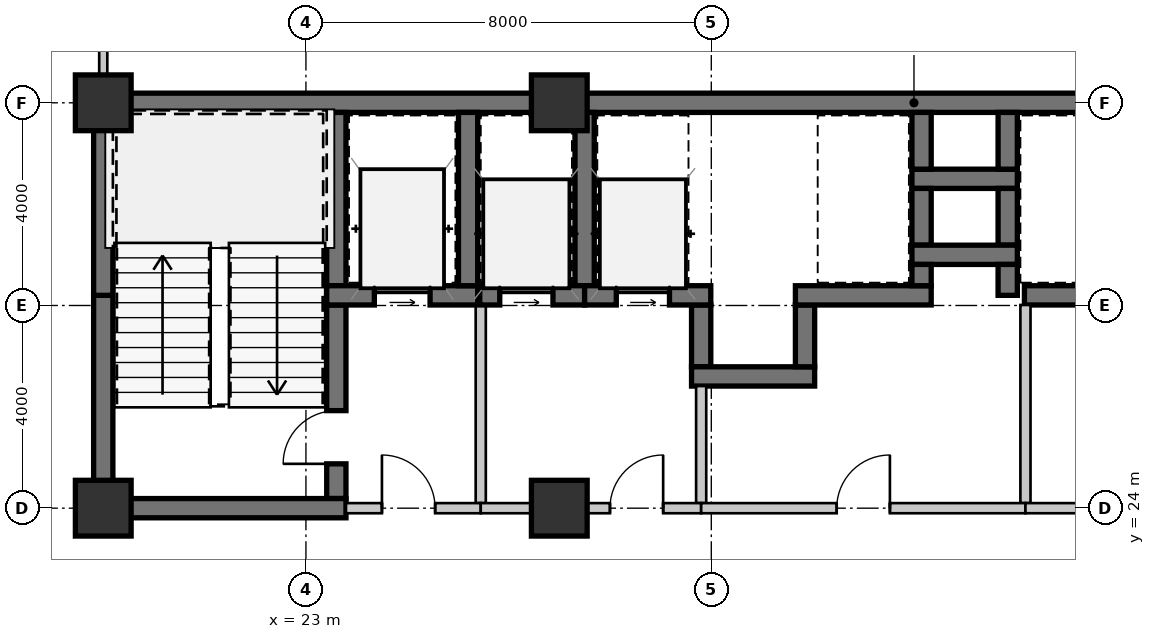
"""IFC4 building model, lengths in metres.
Left out: names, types, materials, properties, quantities, classifications, styles, units other than length and angle.
Written with IfcOpenShell. Run it as: python <this file> out.ifc"""

import sys

from ifc_helpers import new_model, si_unit, direction, frame, frame_2d, origin, origin_2d, place, context, subcontext, project, spatial, rectangle, extrude, source, transform, mapped, element, fill, save


model = new_model("IFC4")
c1 = context("Model", 3, precision=1e-05, world=origin(), true_north=direction((0.0, 1.0)))
c2 = subcontext(c1, "Body", "Model", "MODEL_VIEW")
j1 = project(units=[si_unit("LENGTHUNIT", "METRE"), si_unit("PLANEANGLEUNIT", "RADIAN")], contexts=[c1])
p1 = place(None, origin())
s1 = spatial("IfcSite", under=j1, at=p1, CompositionType="ELEMENT")
p2 = place(p1, origin())
s2 = spatial("IfcBuilding", under=s1, at=p2, CompositionType="ELEMENT")
p3 = place(p2, frame((0.0, 0.0, 4.55)))
s3 = spatial("IfcBuildingStorey", under=s2, at=p3, CompositionType="ELEMENT", Elevation=4.55)
m1 = source(origin(), c2, "Body", "SweptSolid", [
    extrude(rectangle(XDim=1.1, YDim=1.1, at=origin_2d()), origin(), (0.0, 0.0, 1.0), 3.85),
])
for number, where, z_axis, x_axis in (
    (1, (19.0, 24.0, 0.0), (0.0, 0.0, 1.0), (1.0, 0.0, 0.0)),
    (2, (28.0, 24.0, 0.0), (0.0, 0.0, 1.0), (1.0, 0.0, 0.0)),
    (3, (19.0, 32.0, 0.0), (0.0, 0.0, 1.0), (1.0, 0.0, 0.0)),
    (4, (28.0, 32.0, 0.0), (0.0, 0.0, 1.0), (1.0, 0.0, 0.0)),
):
    element("IfcColumn", number, at=place(p3, frame(where, z_axis=z_axis, x_axis=x_axis)), inside=s3, PredefinedType="COLUMN", context=c2, shape_type="MappedRepresentation", body=[
        mapped(m1, transform((0.0, 0.0, 0.0), scale=1.0)),
    ])
m2 = source(origin(), c2, "Body", "SweptSolid", [
    extrude(rectangle(XDim=9.19, YDim=0.38, at=frame_2d((4.595, 0.0))), origin(), (0.0, 0.0, 1.0), 3.59),
])
p4 = place(p3, frame((18.81, 32.0, 0.0), z_axis=(0.0, 0.0, 1.0), x_axis=(1.0, 0.0, 0.0)))
e5 = element("IfcWall", 5, at=p4, inside=s3, PredefinedType="SHEAR", context=c2, shape_type="MappedRepresentation", body=[
    mapped(m2, transform((0.0, 0.0, 0.0), scale=1.0)),
])
m3 = source(origin(), c2, "Body", "SweptSolid", [
    extrude(rectangle(XDim=11.2, YDim=0.38, at=frame_2d((5.6, 0.0))), origin(), (0.0, 0.0, 1.0), 3.59),
])
p5 = place(p3, frame((28.0, 32.0, 0.0), z_axis=(0.0, 0.0, 1.0), x_axis=(1.0, 0.0, 0.0)))
e6 = element("IfcWall", 6, at=p5, inside=s3, PredefinedType="SHEAR", context=c2, shape_type="MappedRepresentation", body=[
    mapped(m3, transform((0.0, 0.0, 0.0), scale=1.0)),
])
m4 = source(origin(), c2, "Body", "SweptSolid", [
    extrude(rectangle(XDim=4.01, YDim=0.38, at=frame_2d((2.005, 0.0))), origin(), (0.0, 0.0, 1.0), 3.59),
])
p6 = place(p3, frame((19.0, 24.19, 0.0), z_axis=(0.0, 0.0, 1.0), x_axis=(0.0, 1.0, 0.0)))
e7 = element("IfcWall", 7, at=p6, inside=s3, PredefinedType="SHEAR", context=c2, shape_type="MappedRepresentation", body=[
    mapped(m4, transform((0.0, 0.0, 0.0), scale=1.0)),
])
m5 = source(origin(), c2, "Body", "SweptSolid", [
    extrude(rectangle(XDim=3.61, YDim=0.38, at=frame_2d((1.805, 0.0))), origin(), (0.0, 0.0, 1.0), 3.59),
])
p7 = place(p3, frame((19.0, 28.2, 0.0), z_axis=(0.0, 0.0, 1.0), x_axis=(0.0, 1.0, 0.0)))
e8 = element("IfcWall", 8, at=p7, inside=s3, PredefinedType="SHEAR", context=c2, shape_type="MappedRepresentation", body=[
    mapped(m5, transform((0.0, 0.0, 0.0), scale=1.0)),
])
m6 = source(origin(), c2, "Body", "SweptSolid", [
    extrude(rectangle(XDim=3.42, YDim=0.38, at=frame_2d((1.71, 0.0))), origin(), (0.0, 0.0, 1.0), 3.59),
])
p8 = place(p3, frame((23.6, 28.39, 0.0), z_axis=(0.0, 0.0, 1.0), x_axis=(0.0, 1.0, 0.0)))
e9 = element("IfcWall", 9, at=p8, inside=s3, PredefinedType="SHEAR", context=c2, shape_type="MappedRepresentation", body=[
    mapped(m6, transform((0.0, 0.0, 0.0), scale=1.0)),
])
m7 = source(origin(), c2, "Body", "SweptSolid", [
    extrude(rectangle(XDim=3.82, YDim=0.38, at=frame_2d((1.91, 0.0))), origin(), (0.0, 0.0, 1.0), 3.59),
])
p9 = place(p3, frame((23.6, 24.19, 0.0), z_axis=(0.0, 0.0, 1.0), x_axis=(0.0, 1.0, 0.0)))
e10 = element("IfcWall", 10, at=p9, inside=s3, PredefinedType="SHEAR", context=c2, shape_type="MappedRepresentation", body=[
    mapped(m7, transform((0.0, 0.0, 0.0), scale=1.0)),
])
m8 = source(origin(), c2, "Body", "SweptSolid", [
    extrude(rectangle(XDim=1.05, YDim=2.1, at=frame_2d((0.525, 1.05))), frame((0.0, 0.2, 0.0), z_axis=(0.0, -1.0, 0.0), x_axis=(1.0, 0.0, 0.0)), (0.0, 0.0, 1.0), 0.4),
])
p10 = place(p9, frame((0.685, 0.0, 0.0)))
e11 = element("IfcOpeningElement", 11, at=p10, cuts=e10, PredefinedType="OPENING", context=c2, shape_type="MappedRepresentation", body=[
    mapped(m8, transform((0.0, 0.0, 0.0), scale=1.0)),
])
m9 = source(origin(), c2, "Body", "SweptSolid", [
    extrude(rectangle(XDim=4.98, YDim=0.38, at=frame_2d((2.49, 0.0))), origin(), (0.0, 0.0, 1.0), 3.59),
])
p11 = place(p3, frame((18.81, 24.0, 0.0), z_axis=(0.0, 0.0, 1.0), x_axis=(1.0, 0.0, 0.0)))
e12 = element("IfcWall", 12, at=p11, inside=s3, PredefinedType="SHEAR", context=c2, shape_type="MappedRepresentation", body=[
    mapped(m9, transform((0.0, 0.0, 0.0), scale=1.0)),
])
m10 = source(origin(), c2, "Body", "SweptSolid", [
    extrude(rectangle(XDim=2.98, YDim=0.38, at=frame_2d((1.49, 0.0))), origin(), (0.0, 0.0, 1.0), 3.59),
])
p12 = place(p3, frame((23.41, 28.2, 0.0), z_axis=(0.0, 0.0, 1.0), x_axis=(1.0, 0.0, 0.0)))
e13 = element("IfcWall", 13, at=p12, inside=s3, PredefinedType="SHEAR", context=c2, shape_type="MappedRepresentation", body=[
    mapped(m10, transform((0.0, 0.0, 0.0), scale=1.0)),
])
m11 = source(origin(), c2, "Body", "SweptSolid", [
    extrude(rectangle(XDim=1.1, YDim=2.15, at=frame_2d((0.55, 1.075))), frame((0.0, 0.2, 0.0), z_axis=(0.0, -1.0, 0.0), x_axis=(1.0, 0.0, 0.0)), (0.0, 0.0, 1.0), 0.4),
])
p13 = place(p12, frame((0.94, 0.0, 0.0)))
e14 = element("IfcOpeningElement", 14, at=p13, cuts=e13, PredefinedType="OPENING", context=c2, shape_type="MappedRepresentation", body=[
    mapped(m11, transform((0.0, 0.0, 0.0), scale=1.0)),
])
p14 = place(p3, frame((26.2, 28.39, 0.0), z_axis=(0.0, 0.0, 1.0), x_axis=(0.0, 1.0, 0.0)))
e15 = element("IfcWall", 15, at=p14, inside=s3, PredefinedType="SHEAR", context=c2, shape_type="MappedRepresentation", body=[
    mapped(m6, transform((0.0, 0.0, 0.0), scale=1.0)),
])
m12 = source(origin(), c2, "Body", "SweptSolid", [
    extrude(rectangle(XDim=3.91, YDim=0.2, at=frame_2d((1.955, 0.0))), origin(), (0.0, 0.0, 1.0), 3.59),
])
p15 = place(p3, frame((26.45, 24.1, 0.0), z_axis=(0.0, 0.0, 1.0), x_axis=(0.0, 1.0, 0.0)))
e16 = element("IfcWall", 16, at=p15, inside=s3, PredefinedType="SOLIDWALL", context=c2, shape_type="MappedRepresentation", body=[
    mapped(m12, transform((0.0, 0.0, 0.0), scale=1.0)),
])
m13 = source(origin(), c2, "Body", "SweptSolid", [
    extrude(rectangle(XDim=2.66, YDim=0.2, at=frame_2d((1.33, 0.0))), origin(), (0.0, 0.0, 1.0), 3.13),
])
p16 = place(p3, frame((23.79, 24.0, 0.0), z_axis=(0.0, 0.0, 1.0), x_axis=(1.0, 0.0, 0.0)))
e17 = element("IfcWall", 17, at=p16, inside=s3, PredefinedType="SOLIDWALL", context=c2, shape_type="MappedRepresentation", body=[
    mapped(m13, transform((0.0, 0.0, 0.0), scale=1.0)),
])
m14 = source(origin(), c2, "Body", "SweptSolid", [
    extrude(rectangle(XDim=1.05, YDim=2.1, at=frame_2d((0.525, 1.05))), frame((0.0, 0.11, 0.0), z_axis=(0.0, -1.0, 0.0), x_axis=(1.0, 0.0, 0.0)), (0.0, 0.0, 1.0), 0.22),
])
p17 = place(p16, frame((0.71, 0.0, 0.0)))
e18 = element("IfcOpeningElement", 18, at=p17, cuts=e17, PredefinedType="OPENING", context=c2, shape_type="MappedRepresentation", body=[
    mapped(m14, transform((0.0, 0.0, 0.0), scale=1.0)),
])
m15 = source(origin(), c2, "Body", "SweptSolid", [
    extrude(rectangle(XDim=2.08, YDim=0.38, at=frame_2d((1.04, 0.0))), origin(), (0.0, 0.0, 1.0), 3.59),
])
p18 = place(p3, frame((34.96, 30.5, 0.0), z_axis=(0.0, 0.0, 1.0), x_axis=(1.0, 0.0, 0.0)))
e19 = element("IfcWall", 19, at=p18, inside=s3, PredefinedType="SHEAR", context=c2, shape_type="MappedRepresentation", body=[
    mapped(m15, transform((0.0, 0.0, 0.0), scale=1.0)),
])
m16 = source(origin(), c2, "Body", "SweptSolid", [
    extrude(rectangle(XDim=1.12, YDim=0.38, at=frame_2d((0.56, 0.0))), origin(), (0.0, 0.0, 1.0), 3.59),
])
for number, where, z_axis, x_axis in (
    (20, (35.15, 31.81, 0.0), (0.0, 0.0, 1.0), (0.0, -1.0, 0.0)),
    (21, (36.85, 30.69, 0.0), (0.0, 0.0, 1.0), (0.0, 1.0, 0.0)),
    (22, (35.15, 30.31, 0.0), (0.0, 0.0, 1.0), (0.0, -1.0, 0.0)),
    (23, (36.85, 29.19, 0.0), (0.0, 0.0, 1.0), (0.0, 1.0, 0.0)),
):
    element("IfcWall", number, at=place(p3, frame(where, z_axis=z_axis, x_axis=x_axis)), inside=s3, PredefinedType="SHEAR", context=c2, shape_type="MappedRepresentation", body=[
        mapped(m16, transform((0.0, 0.0, 0.0), scale=1.0)),
    ])
p19 = place(p3, frame((34.96, 29.0, 0.0), z_axis=(0.0, 0.0, 1.0), x_axis=(1.0, 0.0, 0.0)))
e24 = element("IfcWall", 24, at=p19, inside=s3, PredefinedType="SHEAR", context=c2, shape_type="MappedRepresentation", body=[
    mapped(m15, transform((0.0, 0.0, 0.0), scale=1.0)),
])
m17 = source(origin(), c2, "Body", "SweptSolid", [
    extrude(rectangle(XDim=1.22, YDim=0.38, at=frame_2d((0.61, 0.0))), origin(), (0.0, 0.0, 1.0), 3.59),
])
p20 = place(p3, frame((30.8, 28.01, 0.0), z_axis=(0.0, 0.0, 1.0), x_axis=(0.0, -1.0, 0.0)))
e25 = element("IfcWall", 25, at=p20, inside=s3, PredefinedType="SHEAR", context=c2, shape_type="MappedRepresentation", body=[
    mapped(m17, transform((0.0, 0.0, 0.0), scale=1.0)),
])
m18 = source(origin(), c2, "Body", "SweptSolid", [
    extrude(rectangle(XDim=2.43, YDim=0.38, at=frame_2d((1.215, 0.0))), origin(), (0.0, 0.0, 1.0), 3.59),
])
p21 = place(p3, frame((30.61, 26.6, 0.0), z_axis=(0.0, 0.0, 1.0), x_axis=(1.0, 0.0, 0.0)))
e26 = element("IfcWall", 26, at=p21, inside=s3, PredefinedType="SHEAR", context=c2, shape_type="MappedRepresentation", body=[
    mapped(m18, transform((0.0, 0.0, 0.0), scale=1.0)),
])
p22 = place(p3, frame((32.85, 26.79, 0.0), z_axis=(0.0, 0.0, 1.0), x_axis=(0.0, 1.0, 0.0)))
e27 = element("IfcWall", 27, at=p22, inside=s3, PredefinedType="SHEAR", context=c2, shape_type="MappedRepresentation", body=[
    mapped(m17, transform((0.0, 0.0, 0.0), scale=1.0)),
])
p23 = place(p3, frame((28.5, 28.39, 0.0), z_axis=(0.0, 0.0, 1.0), x_axis=(0.0, 1.0, 0.0)))
e28 = element("IfcWall", 28, at=p23, inside=s3, PredefinedType="SHEAR", context=c2, shape_type="MappedRepresentation", body=[
    mapped(m6, transform((0.0, 0.0, 0.0), scale=1.0)),
])
m19 = source(origin(), c2, "Body", "SweptSolid", [
    extrude(rectangle(XDim=2.07, YDim=0.38, at=frame_2d((1.035, 0.0))), origin(), (0.0, 0.0, 1.0), 3.59),
])
p24 = place(p3, frame((26.43, 28.2, 0.0), z_axis=(0.0, 0.0, 1.0), x_axis=(1.0, 0.0, 0.0)))
e29 = element("IfcWall", 29, at=p24, inside=s3, PredefinedType="SHEAR", context=c2, shape_type="MappedRepresentation", body=[
    mapped(m19, transform((0.0, 0.0, 0.0), scale=1.0)),
])
m20 = source(origin(), c2, "Body", "SweptSolid", [
    extrude(rectangle(XDim=1.05, YDim=2.15, at=frame_2d((0.525, 1.075))), frame((0.0, 0.2, 0.0), z_axis=(0.0, -1.0, 0.0), x_axis=(1.0, 0.0, 0.0)), (0.0, 0.0, 1.0), 0.4),
])
p25 = place(p24, frame((0.395, 0.0, 0.0)))
e30 = element("IfcOpeningElement", 30, at=p25, cuts=e29, PredefinedType="OPENING", context=c2, shape_type="MappedRepresentation", body=[
    mapped(m20, transform((0.0, 0.0, 0.0), scale=1.0)),
])
m21 = source(origin(), c2, "Body", "SweptSolid", [
    extrude(rectangle(XDim=2.49, YDim=0.38, at=frame_2d((1.245, 0.0))), origin(), (0.0, 0.0, 1.0), 3.59),
])
p26 = place(p3, frame((28.5, 28.2, 0.0), z_axis=(0.0, 0.0, 1.0), x_axis=(1.0, 0.0, 0.0)))
e31 = element("IfcWall", 31, at=p26, inside=s3, PredefinedType="SHEAR", context=c2, shape_type="MappedRepresentation", body=[
    mapped(m21, transform((0.0, 0.0, 0.0), scale=1.0)),
])
p27 = place(p26, frame((0.625, 0.0, 0.0)))
e32 = element("IfcOpeningElement", 32, at=p27, cuts=e31, PredefinedType="OPENING", context=c2, shape_type="MappedRepresentation", body=[
    mapped(m20, transform((0.0, 0.0, 0.0), scale=1.0)),
])
m22 = source(origin(), c2, "Body", "SweptSolid", [
    extrude(rectangle(XDim=2.31, YDim=0.2, at=frame_2d((1.155, 0.0))), origin(), (0.0, 0.0, 1.0), 3.59),
])
p28 = place(p3, frame((30.8, 26.41, 0.0), z_axis=(0.0, 0.0, 1.0), x_axis=(0.0, -1.0, 0.0)))
e33 = element("IfcWall", 33, at=p28, inside=s3, PredefinedType="SOLIDWALL", context=c2, shape_type="MappedRepresentation", body=[
    mapped(m22, transform((0.0, 0.0, 0.0), scale=1.0)),
])
m23 = source(origin(), c2, "Body", "SweptSolid", [
    extrude(rectangle(XDim=4.35, YDim=0.2, at=frame_2d((2.175, 0.0))), origin(), (0.0, 0.0, 1.0), 3.13),
])
p29 = place(p3, frame((30.8, 24.0, 0.0), z_axis=(0.0, 0.0, 1.0), x_axis=(-1.0, 0.0, 0.0)))
e34 = element("IfcWall", 34, at=p29, inside=s3, PredefinedType="SOLIDWALL", context=c2, shape_type="MappedRepresentation", body=[
    mapped(m23, transform((0.0, 0.0, 0.0), scale=1.0)),
])
p30 = place(p29, frame((0.75, 0.0, 0.0)))
e35 = element("IfcOpeningElement", 35, at=p30, cuts=e34, PredefinedType="OPENING", context=c2, shape_type="MappedRepresentation", body=[
    mapped(m14, transform((0.0, 0.0, 0.0), scale=1.0)),
])
m24 = source(origin(), c2, "Body", "SweptSolid", [
    extrude(rectangle(XDim=2.68, YDim=0.38, at=frame_2d((1.34, 0.0))), origin(), (0.0, 0.0, 1.0), 3.59),
])
p31 = place(p3, frame((32.66, 28.2, 0.0), z_axis=(0.0, 0.0, 1.0), x_axis=(1.0, 0.0, 0.0)))
e36 = element("IfcWall", 36, at=p31, inside=s3, PredefinedType="SHEAR", context=c2, shape_type="MappedRepresentation", body=[
    mapped(m24, transform((0.0, 0.0, 0.0), scale=1.0)),
])
m25 = source(origin(), c2, "Body", "SweptSolid", [
    extrude(rectangle(XDim=0.42, YDim=0.38, at=frame_2d((0.21, 0.0))), origin(), (0.0, 0.0, 1.0), 3.59),
])
p32 = place(p3, frame((35.15, 28.39, 0.0), z_axis=(0.0, 0.0, 1.0), x_axis=(0.0, 1.0, 0.0)))
e37 = element("IfcWall", 37, at=p32, inside=s3, PredefinedType="SHEAR", context=c2, shape_type="MappedRepresentation", body=[
    mapped(m25, transform((0.0, 0.0, 0.0), scale=1.0)),
])
m26 = source(origin(), c2, "Body", "SweptSolid", [
    extrude(rectangle(XDim=0.61, YDim=0.38, at=frame_2d((0.305, 0.0))), origin(), (0.0, 0.0, 1.0), 3.59),
])
p33 = place(p3, frame((36.85, 28.81, 0.0), z_axis=(0.0, 0.0, 1.0), x_axis=(0.0, -1.0, 0.0)))
e38 = element("IfcWall", 38, at=p33, inside=s3, PredefinedType="SHEAR", context=c2, shape_type="MappedRepresentation", body=[
    mapped(m26, transform((0.0, 0.0, 0.0), scale=1.0)),
])
m27 = source(origin(), c2, "Body", "SweptSolid", [
    extrude(rectangle(XDim=2.02, YDim=0.38, at=frame_2d((1.01, 0.0))), origin(), (0.0, 0.0, 1.0), 3.59),
])
p34 = place(p3, frame((37.18, 28.2, 0.0), z_axis=(0.0, 0.0, 1.0), x_axis=(1.0, 0.0, 0.0)))
e39 = element("IfcWall", 39, at=p34, inside=s3, PredefinedType="SHEAR", context=c2, shape_type="MappedRepresentation", body=[
    mapped(m27, transform((0.0, 0.0, 0.0), scale=1.0)),
])
p35 = place(p3, frame((37.2, 28.01, 0.0), z_axis=(0.0, 0.0, 1.0), x_axis=(0.0, -1.0, 0.0)))
e40 = element("IfcWall", 40, at=p35, inside=s3, PredefinedType="SOLIDWALL", context=c2, shape_type="MappedRepresentation", body=[
    mapped(m12, transform((0.0, 0.0, 0.0), scale=1.0)),
])
m28 = source(origin(), c2, "Body", "SweptSolid", [
    extrude(rectangle(XDim=6.4, YDim=0.2, at=frame_2d((3.2, 0.0))), origin(), (0.0, 0.0, 1.0), 3.13),
])
p36 = place(p3, frame((37.2, 24.0, 0.0), z_axis=(0.0, 0.0, 1.0), x_axis=(-1.0, 0.0, 0.0)))
e41 = element("IfcWall", 41, at=p36, inside=s3, PredefinedType="SOLIDWALL", context=c2, shape_type="MappedRepresentation", body=[
    mapped(m28, transform((0.0, 0.0, 0.0), scale=1.0)),
])
p37 = place(p36, frame((2.675, 0.0, 0.0)))
e42 = element("IfcOpeningElement", 42, at=p37, cuts=e41, PredefinedType="OPENING", context=c2, shape_type="MappedRepresentation", body=[
    mapped(m14, transform((0.0, 0.0, 0.0), scale=1.0)),
])
m29 = source(origin(), c2, "Body", "SweptSolid", [
    extrude(rectangle(XDim=2.0, YDim=0.2, at=frame_2d((1.0, 0.0))), origin(), (0.0, 0.0, 1.0), 3.13),
])
p38 = place(p3, frame((39.2, 24.0, 0.0), z_axis=(0.0, 0.0, 1.0), x_axis=(-1.0, 0.0, 0.0)))
e43 = element("IfcWall", 43, at=p38, inside=s3, PredefinedType="SOLIDWALL", context=c2, shape_type="MappedRepresentation", body=[
    mapped(m29, transform((0.0, 0.0, 0.0), scale=1.0)),
])
m30 = source(origin(), c2, "Body", "SweptSolid", [
    extrude(rectangle(XDim=7.578, YDim=0.16, at=frame_2d((3.789, 0.0))), origin(), (0.0, 0.0, 1.0), 3.59),
])
p39 = place(p3, frame((19.0, 39.768, 0.0), z_axis=(0.0, 0.0, 1.0), x_axis=(0.0, -1.0, 0.0)))
e44 = element("IfcWall", 44, at=p39, inside=s3, PredefinedType="PARTITIONING", context=c2, shape_type="MappedRepresentation", body=[
    mapped(m30, transform((0.0, 0.0, 0.0), scale=1.0)),
])
m31 = source(origin(), c2, "Body", "SweptSolid", [
    extrude(rectangle(XDim=1.05, YDim=2.1, at=frame_2d((0.525, 1.05))), frame((0.0, 0.025, 0.0), z_axis=(0.0, -1.0, 0.0), x_axis=(1.0, 0.0, 0.0)), (0.0, 0.0, 1.0), 0.05),
])
p40 = place(p10, origin())
e45 = element("IfcDoor", 45, at=p40, inside=s3, OperationType="SINGLE_SWING_LEFT", PredefinedType="DOOR", context=c2, shape_type="MappedRepresentation", body=[
    mapped(m31, transform((0.0, 0.0, 0.0), scale=1.0)),
])
fill(e11, e45)
m32 = source(origin(), c2, "Body", "SweptSolid", [
    extrude(rectangle(XDim=1.1, YDim=2.15, at=frame_2d((0.55, 1.075))), frame((0.0, 0.025, 0.0), z_axis=(0.0, -1.0, 0.0), x_axis=(1.0, 0.0, 0.0)), (0.0, 0.0, 1.0), 0.05),
])
p41 = place(p13, origin())
e46 = element("IfcDoor", 46, at=p41, inside=s3, OperationType="SLIDING_TO_LEFT", PredefinedType="DOOR", context=c2, shape_type="MappedRepresentation", body=[
    mapped(m32, transform((0.0, 0.0, 0.0), scale=1.0)),
])
fill(e14, e46)
p42 = place(p17, origin())
e47 = element("IfcDoor", 47, at=p42, inside=s3, OperationType="SINGLE_SWING_LEFT", PredefinedType="DOOR", context=c2, shape_type="MappedRepresentation", body=[
    mapped(m31, transform((0.0, 0.0, 0.0), scale=1.0)),
])
fill(e18, e47)
m33 = source(origin(), c2, "Body", "SweptSolid", [
    extrude(rectangle(XDim=1.05, YDim=2.15, at=frame_2d((0.525, 1.075))), frame((0.0, 0.025, 0.0), z_axis=(0.0, -1.0, 0.0), x_axis=(1.0, 0.0, 0.0)), (0.0, 0.0, 1.0), 0.05),
])
p43 = place(p25, origin())
e48 = element("IfcDoor", 48, at=p43, inside=s3, OperationType="SLIDING_TO_LEFT", PredefinedType="DOOR", context=c2, shape_type="MappedRepresentation", body=[
    mapped(m33, transform((0.0, 0.0, 0.0), scale=1.0)),
])
fill(e30, e48)
p44 = place(p27, origin())
e49 = element("IfcDoor", 49, at=p44, inside=s3, OperationType="SLIDING_TO_LEFT", PredefinedType="DOOR", context=c2, shape_type="MappedRepresentation", body=[
    mapped(m33, transform((0.0, 0.0, 0.0), scale=1.0)),
])
fill(e32, e49)
p45 = place(p30, frame((1.05, 0.0, 0.0), z_axis=(0.0, 0.0, 1.0), x_axis=(-1.0, 0.0, 0.0)))
e50 = element("IfcDoor", 50, at=p45, inside=s3, OperationType="SINGLE_SWING_RIGHT", PredefinedType="DOOR", context=c2, shape_type="MappedRepresentation", body=[
    mapped(m31, transform((0.0, 0.0, 0.0), scale=1.0)),
])
fill(e35, e50)
p46 = place(p37, frame((1.05, 0.0, 0.0), z_axis=(0.0, 0.0, 1.0), x_axis=(-1.0, 0.0, 0.0)))
e51 = element("IfcDoor", 51, at=p46, inside=s3, OperationType="SINGLE_SWING_RIGHT", PredefinedType="DOOR", context=c2, shape_type="MappedRepresentation", body=[
    mapped(m31, transform((0.0, 0.0, 0.0), scale=1.0)),
])
fill(e42, e51)
save(model, sys.argv[1])
